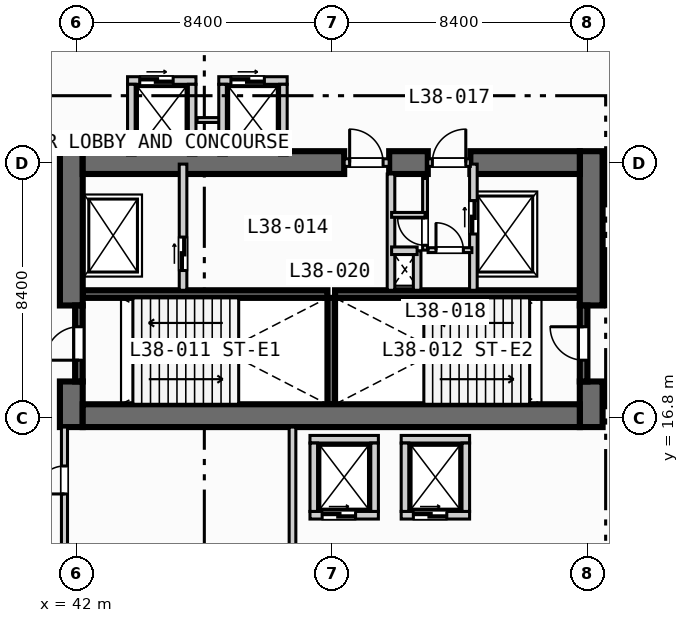
"""IFC4 building model, lengths in metres.
Left out: names, types, materials, properties, quantities, classifications, styles, units other than length and angle.
Written with IfcOpenShell. Run it as: python <this file> out.ifc"""

import sys

from ifc_helpers import new_model, si_unit, direction, frame, frame_2d, origin, place, context, subcontext, project, spatial, rectangle, extrude, element, fill, save


model = new_model("IFC4")
c1 = context("Model", 3, precision=1e-05, world=origin(), true_north=direction((0.0, 1.0)))
c2 = subcontext(c1, "Body", "Model", "MODEL_VIEW")
j1 = project(units=[si_unit("LENGTHUNIT", "METRE"), si_unit("PLANEANGLEUNIT", "RADIAN")], contexts=[c1])
p1 = place(None, origin())
s1 = spatial("IfcSite", under=j1, at=p1, CompositionType="ELEMENT")
p2 = place(p1, origin())
s2 = spatial("IfcBuilding", under=s1, at=p2, CompositionType="ELEMENT")
p3 = place(p2, frame((0.0, 0.0, 157.6)))
s3 = spatial("IfcBuildingStorey", under=s2, at=p3, CompositionType="ELEMENT", Elevation=157.6)
for number, where, z_axis, x_axis in (
    (1, (42.2, 20.875, 0.0), (0.0, 0.0, 1.0), (1.0, 0.0, 0.0)),
    (2, (50.5, 20.875, 0.0), (0.0, 0.0, 1.0), (1.0, 0.0, 0.0)),
):
    element("IfcWall", number, at=place(p3, frame(where, z_axis=z_axis, x_axis=x_axis)), inside=s3, PredefinedType="SOLIDWALL", context=c2, shape_type="SweptSolid", body=[
        extrude(rectangle(XDim=8.05, YDim=0.25, at=frame_2d((4.025, 0.0))), origin(), (0.0, 0.0, 1.0), 4.05),
    ])
p4 = place(p3, frame((50.375, 17.25, 0.0), z_axis=(0.0, 0.0, 1.0), x_axis=(0.0, 1.0, 0.0)))
e3 = element("IfcWall", 3, at=p4, inside=s3, PredefinedType="SOLIDWALL", context=c2, shape_type="SweptSolid", body=[
    extrude(rectangle(XDim=3.5, YDim=0.25, at=frame_2d((1.75, 0.0))), origin(), (0.0, 0.0, 1.0), 4.05),
])
p5 = place(p3, frame((41.825, 16.5, 0.0), z_axis=(0.0, 0.0, 1.0), x_axis=(0.0, 1.0, 0.0)))
e4 = element("IfcWall", 4, at=p5, inside=s3, PredefinedType="SHEAR", context=c2, shape_type="SweptSolid", body=[
    extrude(rectangle(XDim=1.5, YDim=0.75, at=frame_2d((0.75, 0.0))), origin(), (0.0, 0.0, 1.0), 4.05),
])
p6 = place(p3, frame((41.825, 20.5, 0.0), z_axis=(0.0, 0.0, 1.0), x_axis=(0.0, 1.0, 0.0)))
e5 = element("IfcWall", 5, at=p6, inside=s3, PredefinedType="SHEAR", context=c2, shape_type="SweptSolid", body=[
    extrude(rectangle(XDim=5.075, YDim=0.75, at=frame_2d((2.538, 0.0))), origin(), (0.0, 0.0, 1.0), 4.05),
])
p7 = place(p3, frame((58.925, 16.5, 0.0), z_axis=(0.0, 0.0, 1.0), x_axis=(0.0, 1.0, 0.0)))
e6 = element("IfcWall", 6, at=p7, inside=s3, PredefinedType="SHEAR", context=c2, shape_type="SweptSolid", body=[
    extrude(rectangle(XDim=1.5, YDim=0.75, at=frame_2d((0.75, 0.0))), origin(), (0.0, 0.0, 1.0), 4.05),
])
p8 = place(p3, frame((58.925, 20.5, 0.0), z_axis=(0.0, 0.0, 1.0), x_axis=(0.0, 1.0, 0.0)))
e7 = element("IfcWall", 7, at=p8, inside=s3, PredefinedType="SHEAR", context=c2, shape_type="SweptSolid", body=[
    extrude(rectangle(XDim=5.075, YDim=0.75, at=frame_2d((2.538, 0.0))), origin(), (0.0, 0.0, 1.0), 4.05),
])
p9 = place(p3, frame((42.2, 16.875, 0.0), z_axis=(0.0, 0.0, 1.0), x_axis=(1.0, 0.0, 0.0)))
e8 = element("IfcWall", 8, at=p9, inside=s3, PredefinedType="SHEAR", context=c2, shape_type="SweptSolid", body=[
    extrude(rectangle(XDim=16.35, YDim=0.75, at=frame_2d((8.175, 0.0))), origin(), (0.0, 0.0, 1.0), 4.05),
])
p10 = place(p3, frame((42.2, 25.2, 0.0), z_axis=(0.0, 0.0, 1.0), x_axis=(1.0, 0.0, 0.0)))
e9 = element("IfcWall", 9, at=p10, inside=s3, PredefinedType="SHEAR", context=c2, shape_type="SweptSolid", body=[
    extrude(rectangle(XDim=8.6, YDim=0.75, at=frame_2d((4.3, 0.0))), origin(), (0.0, 0.0, 1.0), 4.05),
])
p11 = place(p3, frame((52.28, 25.2, 0.0), z_axis=(0.0, 0.0, 1.0), x_axis=(1.0, 0.0, 0.0)))
e10 = element("IfcWall", 10, at=p11, inside=s3, PredefinedType="SHEAR", context=c2, shape_type="SweptSolid", body=[
    extrude(rectangle(XDim=1.27, YDim=0.75, at=frame_2d((0.635, 0.0))), origin(), (0.0, 0.0, 1.0), 4.05),
])
p12 = place(p3, frame((54.95, 25.2, 0.0), z_axis=(0.0, 0.0, 1.0), x_axis=(1.0, 0.0, 0.0)))
e11 = element("IfcWall", 11, at=p12, inside=s3, PredefinedType="SHEAR", context=c2, shape_type="SweptSolid", body=[
    extrude(rectangle(XDim=3.6, YDim=0.75, at=frame_2d((1.8, 0.0))), origin(), (0.0, 0.0, 1.0), 4.05),
])
p13 = place(p3, frame((42.075, 18.0, 0.0), z_axis=(0.0, 0.0, 1.0), x_axis=(0.0, 1.0, 0.0)))
e12 = element("IfcWall", 12, at=p13, inside=s3, PredefinedType="SOLIDWALL", context=c2, shape_type="SweptSolid", body=[
    extrude(rectangle(XDim=2.5, YDim=0.25, at=frame_2d((1.25, 0.0))), origin(), (0.0, 0.0, 1.0), 4.05),
])
p14 = place(p13, frame((0.7, 0.0, 0.0)))
e13 = element("IfcOpeningElement", 13, at=p14, cuts=e12, PredefinedType="OPENING", context=c2, shape_type="SweptSolid", body=[
    extrude(rectangle(XDim=1.1, YDim=2.15, at=frame_2d((0.55, 1.075))), frame((0.0, 0.135, 0.0), z_axis=(0.0, -1.0, 0.0), x_axis=(1.0, 0.0, 0.0)), (0.0, 0.0, 1.0), 0.27),
])
p15 = place(p3, frame((58.675, 18.0, 0.0), z_axis=(0.0, 0.0, 1.0), x_axis=(0.0, 1.0, 0.0)))
e14 = element("IfcWall", 14, at=p15, inside=s3, PredefinedType="SOLIDWALL", context=c2, shape_type="SweptSolid", body=[
    extrude(rectangle(XDim=2.5, YDim=0.25, at=frame_2d((1.25, 0.0))), origin(), (0.0, 0.0, 1.0), 4.05),
])
p16 = place(p15, frame((0.7, 0.0, 0.0)))
e15 = element("IfcOpeningElement", 15, at=p16, cuts=e14, PredefinedType="OPENING", context=c2, shape_type="SweptSolid", body=[
    extrude(rectangle(XDim=1.1, YDim=2.15, at=frame_2d((0.55, 1.075))), frame((0.0, 0.135, 0.0), z_axis=(0.0, -1.0, 0.0), x_axis=(1.0, 0.0, 0.0)), (0.0, 0.0, 1.0), 0.27),
])
p17 = place(p3, frame((45.5, 21.0, 0.0), z_axis=(0.0, 0.0, 1.0), x_axis=(0.0, 1.0, 0.0)))
e16 = element("IfcWall", 16, at=p17, inside=s3, PredefinedType="SOLIDWALL", context=c2, shape_type="SweptSolid", body=[
    extrude(rectangle(XDim=4.15, YDim=0.25, at=frame_2d((2.075, 0.0))), origin(), (0.0, 0.0, 1.0), 4.05),
])
p18 = place(p17, frame((0.65, 0.0, 0.0)))
e17 = element("IfcOpeningElement", 17, at=p18, cuts=e16, PredefinedType="OPENING", context=c2, shape_type="SweptSolid", body=[
    extrude(rectangle(XDim=1.1, YDim=2.15, at=frame_2d((0.55, 1.075))), frame((0.0, 0.135, 0.0), z_axis=(0.0, -1.0, 0.0), x_axis=(1.0, 0.0, 0.0)), (0.0, 0.0, 1.0), 0.27),
])
p19 = place(p3, frame((50.8, 25.2, 0.0), z_axis=(0.0, 0.0, 1.0), x_axis=(1.0, 0.0, 0.0)))
e18 = element("IfcWall", 18, at=p19, inside=s3, PredefinedType="SOLIDWALL", context=c2, shape_type="SweptSolid", body=[
    extrude(rectangle(XDim=1.48, YDim=0.25, at=frame_2d((0.74, 0.0))), origin(), (0.0, 0.0, 1.0), 4.05),
])
p20 = place(p19, frame((0.18, 0.0, 0.0)))
e19 = element("IfcOpeningElement", 19, at=p20, cuts=e18, PredefinedType="OPENING", context=c2, shape_type="SweptSolid", body=[
    extrude(rectangle(XDim=1.1, YDim=2.15, at=frame_2d((0.55, 1.075))), frame((0.0, 0.135, 0.0), z_axis=(0.0, -1.0, 0.0), x_axis=(1.0, 0.0, 0.0)), (0.0, 0.0, 1.0), 0.27),
])
p21 = place(p3, frame((52.34, 21.0, 0.0), z_axis=(0.0, 0.0, 1.0), x_axis=(0.0, 1.0, 0.0)))
e20 = element("IfcWall", 20, at=p21, inside=s3, PredefinedType="SOLIDWALL", context=c2, shape_type="SweptSolid", body=[
    extrude(rectangle(XDim=3.825, YDim=0.25, at=frame_2d((1.913, 0.0))), origin(), (0.0, 0.0, 1.0), 4.05),
])
p22 = place(p3, frame((55.05, 21.0, 0.0), z_axis=(0.0, 0.0, 1.0), x_axis=(0.0, 1.0, 0.0)))
e21 = element("IfcWall", 21, at=p22, inside=s3, PredefinedType="SOLIDWALL", context=c2, shape_type="SweptSolid", body=[
    extrude(rectangle(XDim=4.15, YDim=0.25, at=frame_2d((2.075, 0.0))), origin(), (0.0, 0.0, 1.0), 4.05),
])
p23 = place(p22, frame((1.85, 0.0, 0.0)))
e22 = element("IfcOpeningElement", 22, at=p23, cuts=e21, PredefinedType="OPENING", context=c2, shape_type="SweptSolid", body=[
    extrude(rectangle(XDim=1.1, YDim=2.15, at=frame_2d((0.55, 1.075))), frame((0.0, 0.135, 0.0), z_axis=(0.0, -1.0, 0.0), x_axis=(1.0, 0.0, 0.0)), (0.0, 0.0, 1.0), 0.27),
])
p24 = place(p3, frame((53.55, 25.2, 0.0), z_axis=(0.0, 0.0, 1.0), x_axis=(1.0, 0.0, 0.0)))
e23 = element("IfcWall", 23, at=p24, inside=s3, PredefinedType="SOLIDWALL", context=c2, shape_type="SweptSolid", body=[
    extrude(rectangle(XDim=1.4, YDim=0.25, at=frame_2d((0.7, 0.0))), origin(), (0.0, 0.0, 1.0), 4.05),
])
p25 = place(p24, frame((0.15, 0.0, 0.0)))
e24 = element("IfcOpeningElement", 24, at=p25, cuts=e23, PredefinedType="OPENING", context=c2, shape_type="SweptSolid", body=[
    extrude(rectangle(XDim=1.1, YDim=2.15, at=frame_2d((0.55, 1.075))), frame((0.0, 0.135, 0.0), z_axis=(0.0, -1.0, 0.0), x_axis=(1.0, 0.0, 0.0)), (0.0, 0.0, 1.0), 0.27),
])
p26 = place(p3, frame((53.2, 21.0, 0.0), z_axis=(0.0, 0.0, 1.0), x_axis=(0.0, 1.0, 0.0)))
e25 = element("IfcWall", 25, at=p26, inside=s3, PredefinedType="SOLIDWALL", context=c2, shape_type="SweptSolid", body=[
    extrude(rectangle(XDim=1.3, YDim=0.25, at=frame_2d((0.65, 0.0))), origin(), (0.0, 0.0, 1.0), 4.05),
])
p27 = place(p3, frame((52.36, 22.3, 0.0), z_axis=(0.0, 0.0, 1.0), x_axis=(1.0, 0.0, 0.0)))
e26 = element("IfcWall", 26, at=p27, inside=s3, PredefinedType="SOLIDWALL", context=c2, shape_type="SweptSolid", body=[
    extrude(rectangle(XDim=0.84, YDim=0.25, at=frame_2d((0.42, 0.0))), origin(), (0.0, 0.0, 1.0), 4.05),
])
p28 = place(p3, frame((53.56, 22.32, 0.0), z_axis=(0.0, 0.0, 1.0), x_axis=(1.0, 0.0, 0.0)))
e27 = element("IfcWall", 27, at=p28, inside=s3, PredefinedType="PARTITIONING", context=c2, shape_type="SweptSolid", body=[
    extrude(rectangle(XDim=1.44, YDim=0.16, at=frame_2d((0.72, 0.0))), origin(), (0.0, 0.0, 1.0), 4.05),
])
p29 = place(p28, frame((0.26, 0.0, 0.0)))
e28 = element("IfcOpeningElement", 28, at=p29, cuts=e27, PredefinedType="OPENING", context=c2, shape_type="SweptSolid", body=[
    extrude(rectangle(XDim=0.9, YDim=2.1, at=frame_2d((0.45, 1.05))), frame((0.0, 0.09, 0.0), z_axis=(0.0, -1.0, 0.0), x_axis=(1.0, 0.0, 0.0)), (0.0, 0.0, 1.0), 0.18),
])
p30 = place(p3, frame((53.46, 22.32, 0.0), z_axis=(0.0, 0.0, 1.0), x_axis=(0.0, 1.0, 0.0)))
e29 = element("IfcWall", 29, at=p30, inside=s3, PredefinedType="PARTITIONING", context=c2, shape_type="SweptSolid", body=[
    extrude(rectangle(XDim=2.36, YDim=0.16, at=frame_2d((1.18, 0.0))), origin(), (0.0, 0.0, 1.0), 4.05),
])
p31 = place(p30, frame((0.16, 0.0, 0.0)))
e30 = element("IfcOpeningElement", 30, at=p31, cuts=e29, PredefinedType="OPENING", context=c2, shape_type="SweptSolid", body=[
    extrude(rectangle(XDim=0.9, YDim=2.1, at=frame_2d((0.45, 1.05))), frame((0.0, 0.09, 0.0), z_axis=(0.0, -1.0, 0.0), x_axis=(1.0, 0.0, 0.0)), (0.0, 0.0, 1.0), 0.18),
])
p32 = place(p3, frame((52.36, 23.48, 0.0), z_axis=(0.0, 0.0, 1.0), x_axis=(1.0, 0.0, 0.0)))
e31 = element("IfcWall", 31, at=p32, inside=s3, PredefinedType="PARTITIONING", context=c2, shape_type="SweptSolid", body=[
    extrude(rectangle(XDim=1.1, YDim=0.16, at=frame_2d((0.55, 0.0))), origin(), (0.0, 0.0, 1.0), 4.05),
])
p33 = place(p3, frame((49.675, 13.6, 0.0), z_axis=(0.0, 0.0, 1.0), x_axis=(1.0, 0.0, 0.0)))
e32 = element("IfcWall", 32, at=p33, inside=s3, PredefinedType="SOLIDWALL", context=c2, shape_type="SweptSolid", body=[
    extrude(rectangle(XDim=2.25, YDim=0.25, at=frame_2d((1.125, 0.0))), origin(), (0.0, 0.0, 1.0), 4.05),
])
p34 = place(p33, frame((0.4, 0.0, 0.0)))
e33 = element("IfcOpeningElement", 33, at=p34, cuts=e32, PredefinedType="OPENING", context=c2, shape_type="SweptSolid", body=[
    extrude(rectangle(XDim=1.1, YDim=2.15, at=frame_2d((0.55, 1.075))), frame((0.0, 0.135, 0.0), z_axis=(0.0, -1.0, 0.0), x_axis=(1.0, 0.0, 0.0)), (0.0, 0.0, 1.0), 0.27),
])
for number, where, z_axis, x_axis in (
    (34, (49.675, 16.1, 0.0), (0.0, 0.0, 1.0), (1.0, 0.0, 0.0)),
    (35, (49.8, 13.725, 0.0), (0.0, 0.0, 1.0), (0.0, 1.0, 0.0)),
    (36, (51.8, 13.725, 0.0), (0.0, 0.0, 1.0), (0.0, 1.0, 0.0)),
):
    element("IfcWall", number, at=place(p3, frame(where, z_axis=z_axis, x_axis=x_axis)), inside=s3, PredefinedType="SOLIDWALL", context=c2, shape_type="SweptSolid", body=[
        extrude(rectangle(XDim=2.25, YDim=0.25, at=frame_2d((1.125, 0.0))), origin(), (0.0, 0.0, 1.0), 4.05),
    ])
p35 = place(p3, frame((52.675, 13.6, 0.0), z_axis=(0.0, 0.0, 1.0), x_axis=(1.0, 0.0, 0.0)))
e37 = element("IfcWall", 37, at=p35, inside=s3, PredefinedType="SOLIDWALL", context=c2, shape_type="SweptSolid", body=[
    extrude(rectangle(XDim=2.25, YDim=0.25, at=frame_2d((1.125, 0.0))), origin(), (0.0, 0.0, 1.0), 4.05),
])
p36 = place(p35, frame((0.4, 0.0, 0.0)))
e38 = element("IfcOpeningElement", 38, at=p36, cuts=e37, PredefinedType="OPENING", context=c2, shape_type="SweptSolid", body=[
    extrude(rectangle(XDim=1.1, YDim=2.15, at=frame_2d((0.55, 1.075))), frame((0.0, 0.135, 0.0), z_axis=(0.0, -1.0, 0.0), x_axis=(1.0, 0.0, 0.0)), (0.0, 0.0, 1.0), 0.27),
])
for number, where, z_axis, x_axis in (
    (39, (52.675, 16.1, 0.0), (0.0, 0.0, 1.0), (1.0, 0.0, 0.0)),
    (40, (52.8, 13.725, 0.0), (0.0, 0.0, 1.0), (0.0, 1.0, 0.0)),
    (41, (54.8, 13.725, 0.0), (0.0, 0.0, 1.0), (0.0, 1.0, 0.0)),
):
    element("IfcWall", number, at=place(p3, frame(where, z_axis=z_axis, x_axis=x_axis)), inside=s3, PredefinedType="SOLIDWALL", context=c2, shape_type="SweptSolid", body=[
        extrude(rectangle(XDim=2.25, YDim=0.25, at=frame_2d((1.125, 0.0))), origin(), (0.0, 0.0, 1.0), 4.05),
    ])
p37 = place(p3, frame((43.675, 27.9, 0.0), z_axis=(0.0, 0.0, 1.0), x_axis=(1.0, 0.0, 0.0)))
e42 = element("IfcWall", 42, at=p37, inside=s3, PredefinedType="SOLIDWALL", context=c2, shape_type="SweptSolid", body=[
    extrude(rectangle(XDim=2.25, YDim=0.25, at=frame_2d((1.125, 0.0))), origin(), (0.0, 0.0, 1.0), 4.05),
])
p38 = place(p37, frame((0.4, 0.0, 0.0)))
e43 = element("IfcOpeningElement", 43, at=p38, cuts=e42, PredefinedType="OPENING", context=c2, shape_type="SweptSolid", body=[
    extrude(rectangle(XDim=1.1, YDim=2.15, at=frame_2d((0.55, 1.075))), frame((0.0, 0.135, 0.0), z_axis=(0.0, -1.0, 0.0), x_axis=(1.0, 0.0, 0.0)), (0.0, 0.0, 1.0), 0.27),
])
for number, where, z_axis, x_axis in (
    (44, (43.8, 25.45, 0.0), (0.0, 0.0, 1.0), (0.0, 1.0, 0.0)),
    (45, (45.8, 25.45, 0.0), (0.0, 0.0, 1.0), (0.0, 1.0, 0.0)),
):
    element("IfcWall", number, at=place(p3, frame(where, z_axis=z_axis, x_axis=x_axis)), inside=s3, PredefinedType="SOLIDWALL", context=c2, shape_type="SweptSolid", body=[
        extrude(rectangle(XDim=2.325, YDim=0.25, at=frame_2d((1.163, 0.0))), origin(), (0.0, 0.0, 1.0), 4.05),
    ])
p39 = place(p3, frame((45.96, 26.6, 0.0), z_axis=(0.0, 0.0, 1.0), x_axis=(1.0, 0.0, 0.0)))
e46 = element("IfcWall", 46, at=p39, inside=s3, PredefinedType="PARTITIONING", context=c2, shape_type="SweptSolid", body=[
    extrude(rectangle(XDim=0.88, YDim=0.16, at=frame_2d((0.44, 0.0))), origin(), (0.0, 0.0, 1.0), 4.05),
])
p40 = place(p3, frame((46.675, 27.9, 0.0), z_axis=(0.0, 0.0, 1.0), x_axis=(1.0, 0.0, 0.0)))
e47 = element("IfcWall", 47, at=p40, inside=s3, PredefinedType="SOLIDWALL", context=c2, shape_type="SweptSolid", body=[
    extrude(rectangle(XDim=2.25, YDim=0.25, at=frame_2d((1.125, 0.0))), origin(), (0.0, 0.0, 1.0), 4.05),
])
p41 = place(p40, frame((0.4, 0.0, 0.0)))
e48 = element("IfcOpeningElement", 48, at=p41, cuts=e47, PredefinedType="OPENING", context=c2, shape_type="SweptSolid", body=[
    extrude(rectangle(XDim=1.1, YDim=2.15, at=frame_2d((0.55, 1.075))), frame((0.0, 0.135, 0.0), z_axis=(0.0, -1.0, 0.0), x_axis=(1.0, 0.0, 0.0)), (0.0, 0.0, 1.0), 0.27),
])
for number, where, z_axis, x_axis in (
    (49, (46.8, 25.45, 0.0), (0.0, 0.0, 1.0), (0.0, 1.0, 0.0)),
    (50, (48.8, 25.45, 0.0), (0.0, 0.0, 1.0), (0.0, 1.0, 0.0)),
):
    element("IfcWall", number, at=place(p3, frame(where, z_axis=z_axis, x_axis=x_axis)), inside=s3, PredefinedType="SOLIDWALL", context=c2, shape_type="SweptSolid", body=[
        extrude(rectangle(XDim=2.325, YDim=0.25, at=frame_2d((1.163, 0.0))), origin(), (0.0, 0.0, 1.0), 4.05),
    ])
p42 = place(p3, frame((41.6, 0.3, 0.0), z_axis=(0.0, 0.0, 1.0), x_axis=(0.0, 1.0, 0.0)))
e51 = element("IfcWall", 51, at=p42, inside=s3, PredefinedType="PARTITIONING", context=c2, shape_type="SweptSolid", body=[
    extrude(rectangle(XDim=16.2, YDim=0.2, at=frame_2d((8.1, 0.0))), origin(), (0.0, 0.0, 1.0), 4.05),
])
p43 = place(p42, frame((14.0, 0.0, 0.0)))
e52 = element("IfcOpeningElement", 52, at=p43, cuts=e51, PredefinedType="OPENING", context=c2, shape_type="SweptSolid", body=[
    extrude(rectangle(XDim=0.92, YDim=2.1, at=frame_2d((0.46, 1.05))), frame((0.0, 0.11, 0.0), z_axis=(0.0, -1.0, 0.0), x_axis=(1.0, 0.0, 0.0)), (0.0, 0.0, 1.0), 0.22),
])
p44 = place(p3, frame((49.1, 0.3, 0.0), z_axis=(0.0, 0.0, 1.0), x_axis=(0.0, 1.0, 0.0)))
e53 = element("IfcWall", 53, at=p44, inside=s3, PredefinedType="PARTITIONING", context=c2, shape_type="SweptSolid", body=[
    extrude(rectangle(XDim=16.2, YDim=0.22, at=frame_2d((8.1, 0.0))), origin(), (0.0, 0.0, 1.0), 4.05),
])
p45 = place(p14, origin())
e54 = element("IfcDoor", 54, at=p45, inside=s3, OperationType="SINGLE_SWING_LEFT", PredefinedType="DOOR", context=c2, shape_type="SweptSolid", body=[
    extrude(rectangle(XDim=1.1, YDim=2.15, at=frame_2d((0.55, 1.075))), frame((0.0, 0.025, 0.0), z_axis=(0.0, -1.0, 0.0), x_axis=(1.0, 0.0, 0.0)), (0.0, 0.0, 1.0), 0.05),
])
fill(e13, e54)
p46 = place(p16, origin())
e55 = element("IfcDoor", 55, at=p46, inside=s3, OperationType="SINGLE_SWING_RIGHT", PredefinedType="DOOR", context=c2, shape_type="SweptSolid", body=[
    extrude(rectangle(XDim=1.1, YDim=2.15, at=frame_2d((0.55, 1.075))), frame((0.0, 0.025, 0.0), z_axis=(0.0, -1.0, 0.0), x_axis=(1.0, 0.0, 0.0)), (0.0, 0.0, 1.0), 0.05),
])
fill(e15, e55)
p47 = place(p18, origin())
e56 = element("IfcDoor", 56, at=p47, inside=s3, OperationType="SLIDING_TO_LEFT", PredefinedType="DOOR", context=c2, shape_type="SweptSolid", body=[
    extrude(rectangle(XDim=1.1, YDim=2.15, at=frame_2d((0.55, 1.075))), frame((0.0, 0.025, 0.0), z_axis=(0.0, -1.0, 0.0), x_axis=(1.0, 0.0, 0.0)), (0.0, 0.0, 1.0), 0.05),
])
fill(e17, e56)
p48 = place(p20, origin())
e57 = element("IfcDoor", 57, at=p48, inside=s3, OperationType="SINGLE_SWING_LEFT", PredefinedType="DOOR", context=c2, shape_type="SweptSolid", body=[
    extrude(rectangle(XDim=1.1, YDim=2.15, at=frame_2d((0.55, 1.075))), frame((0.0, 0.025, 0.0), z_axis=(0.0, -1.0, 0.0), x_axis=(1.0, 0.0, 0.0)), (0.0, 0.0, 1.0), 0.05),
])
fill(e19, e57)
p49 = place(p23, origin())
e58 = element("IfcDoor", 58, at=p49, inside=s3, OperationType="SLIDING_TO_LEFT", PredefinedType="DOOR", context=c2, shape_type="SweptSolid", body=[
    extrude(rectangle(XDim=1.1, YDim=2.15, at=frame_2d((0.55, 1.075))), frame((0.0, 0.025, 0.0), z_axis=(0.0, -1.0, 0.0), x_axis=(1.0, 0.0, 0.0)), (0.0, 0.0, 1.0), 0.05),
])
fill(e22, e58)
p50 = place(p25, origin())
e59 = element("IfcDoor", 59, at=p50, inside=s3, OperationType="SINGLE_SWING_RIGHT", PredefinedType="DOOR", context=c2, shape_type="SweptSolid", body=[
    extrude(rectangle(XDim=1.1, YDim=2.15, at=frame_2d((0.55, 1.075))), frame((0.0, 0.025, 0.0), z_axis=(0.0, -1.0, 0.0), x_axis=(1.0, 0.0, 0.0)), (0.0, 0.0, 1.0), 0.05),
])
fill(e24, e59)
p51 = place(p29, origin())
e60 = element("IfcDoor", 60, at=p51, inside=s3, OperationType="SINGLE_SWING_LEFT", PredefinedType="DOOR", context=c2, shape_type="SweptSolid", body=[
    extrude(rectangle(XDim=0.9, YDim=2.1, at=frame_2d((0.45, 1.05))), frame((0.0, 0.025, 0.0), z_axis=(0.0, -1.0, 0.0), x_axis=(1.0, 0.0, 0.0)), (0.0, 0.0, 1.0), 0.05),
])
fill(e28, e60)
p52 = place(p31, origin())
e61 = element("IfcDoor", 61, at=p52, inside=s3, OperationType="SINGLE_SWING_RIGHT", PredefinedType="DOOR", context=c2, shape_type="SweptSolid", body=[
    extrude(rectangle(XDim=0.9, YDim=2.1, at=frame_2d((0.45, 1.05))), frame((0.0, 0.025, 0.0), z_axis=(0.0, -1.0, 0.0), x_axis=(1.0, 0.0, 0.0)), (0.0, 0.0, 1.0), 0.05),
])
fill(e30, e61)
p53 = place(p34, origin())
e62 = element("IfcDoor", 62, at=p53, inside=s3, OperationType="SLIDING_TO_LEFT", PredefinedType="DOOR", context=c2, shape_type="SweptSolid", body=[
    extrude(rectangle(XDim=1.1, YDim=2.15, at=frame_2d((0.55, 1.075))), frame((0.0, 0.025, 0.0), z_axis=(0.0, -1.0, 0.0), x_axis=(1.0, 0.0, 0.0)), (0.0, 0.0, 1.0), 0.05),
])
fill(e33, e62)
p54 = place(p36, origin())
e63 = element("IfcDoor", 63, at=p54, inside=s3, OperationType="SLIDING_TO_LEFT", PredefinedType="DOOR", context=c2, shape_type="SweptSolid", body=[
    extrude(rectangle(XDim=1.1, YDim=2.15, at=frame_2d((0.55, 1.075))), frame((0.0, 0.025, 0.0), z_axis=(0.0, -1.0, 0.0), x_axis=(1.0, 0.0, 0.0)), (0.0, 0.0, 1.0), 0.05),
])
fill(e38, e63)
p55 = place(p38, origin())
e64 = element("IfcDoor", 64, at=p55, inside=s3, OperationType="SLIDING_TO_LEFT", PredefinedType="DOOR", context=c2, shape_type="SweptSolid", body=[
    extrude(rectangle(XDim=1.1, YDim=2.15, at=frame_2d((0.55, 1.075))), frame((0.0, 0.025, 0.0), z_axis=(0.0, -1.0, 0.0), x_axis=(1.0, 0.0, 0.0)), (0.0, 0.0, 1.0), 0.05),
])
fill(e43, e64)
p56 = place(p41, origin())
e65 = element("IfcDoor", 65, at=p56, inside=s3, OperationType="SLIDING_TO_LEFT", PredefinedType="DOOR", context=c2, shape_type="SweptSolid", body=[
    extrude(rectangle(XDim=1.1, YDim=2.15, at=frame_2d((0.55, 1.075))), frame((0.0, 0.025, 0.0), z_axis=(0.0, -1.0, 0.0), x_axis=(1.0, 0.0, 0.0)), (0.0, 0.0, 1.0), 0.05),
])
fill(e48, e65)
p57 = place(p43, origin())
e66 = element("IfcDoor", 66, at=p57, inside=s3, OperationType="SINGLE_SWING_LEFT", PredefinedType="DOOR", context=c2, shape_type="SweptSolid", body=[
    extrude(rectangle(XDim=0.92, YDim=2.1, at=frame_2d((0.46, 1.05))), frame((0.0, 0.025, 0.0), z_axis=(0.0, -1.0, 0.0), x_axis=(1.0, 0.0, 0.0)), (0.0, 0.0, 1.0), 0.05),
])
fill(e52, e66)
save(model, sys.argv[1])
